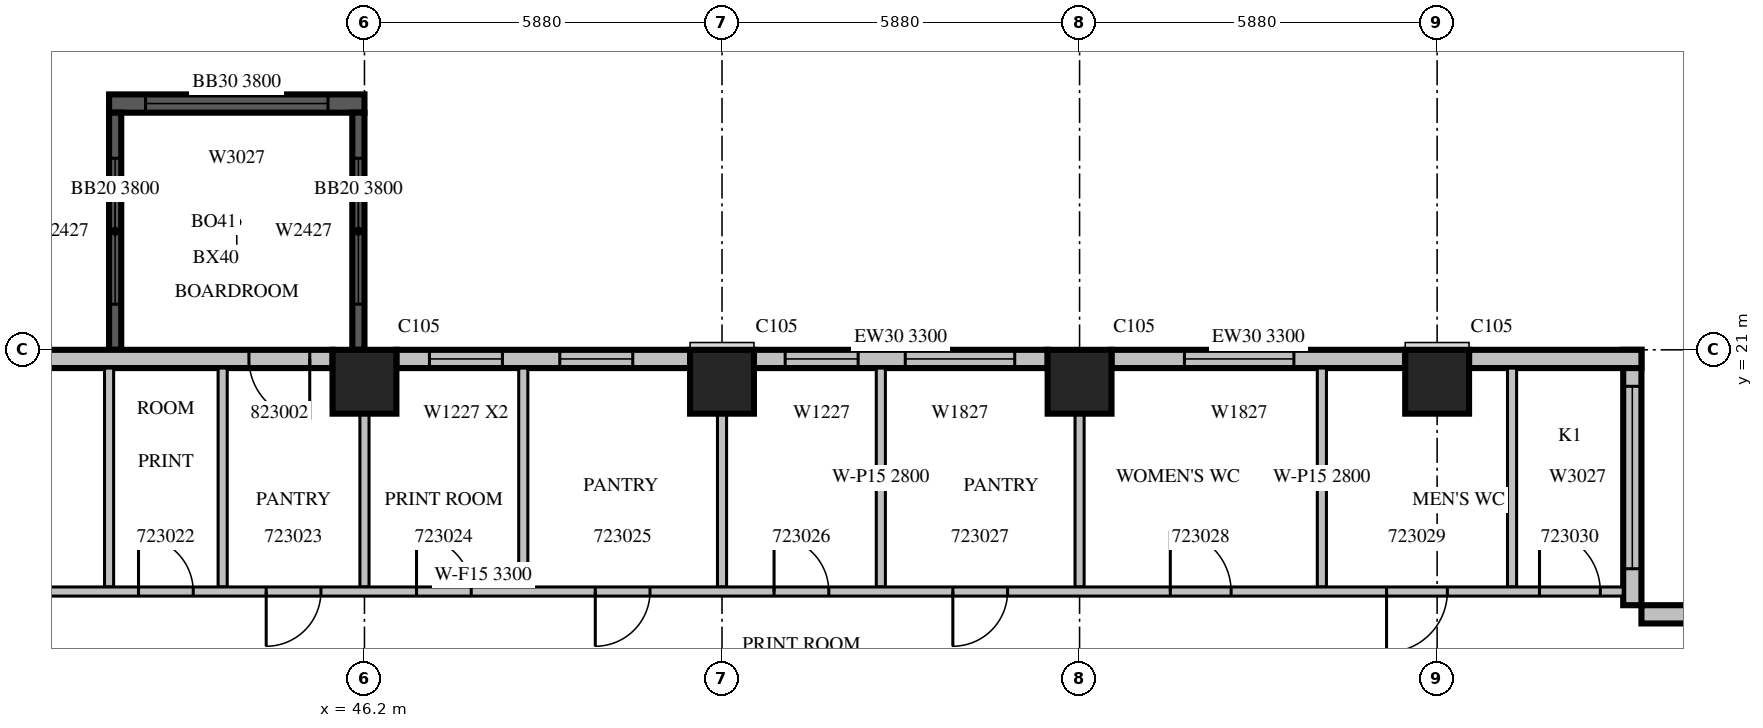
"""IFC4 building model, lengths in metres.
Left out: names, types, materials, properties, quantities, classifications, styles, units other than length and angle.
Written with IfcOpenShell. Run it as: python <this file> out.ifc"""

import sys

from ifc_helpers import new_model, si_unit, direction, frame, frame_2d, origin, origin_2d, place, context, subcontext, project, spatial, rectangle, extrude, source, transform, mapped, element, fill, save


model = new_model("IFC4")
c1 = context("Model", 3, precision=1e-05, world=origin(), true_north=direction((0.0, 1.0)))
c2 = subcontext(c1, "Body", "Model", "MODEL_VIEW")
j1 = project(units=[si_unit("LENGTHUNIT", "METRE"), si_unit("PLANEANGLEUNIT", "RADIAN")], contexts=[c1])
p1 = place(None, origin())
s1 = spatial("IfcSite", under=j1, at=p1, CompositionType="ELEMENT")
p2 = place(p1, origin())
s2 = spatial("IfcBuilding", under=s1, at=p2, CompositionType="ELEMENT")
p3 = place(p2, frame((0.0, 0.0, 107.7)))
s3 = spatial("IfcBuildingStorey", under=s2, at=p3, CompositionType="ELEMENT", Elevation=107.7)
m1 = source(origin(), c2, "Body", "SweptSolid", [
    extrude(rectangle(XDim=1.05, YDim=1.05, at=origin_2d()), origin(), (0.0, 0.0, 1.0), 4.2),
])
for number, where, z_axis, x_axis in (
    (1, (46.2, 20.475, 0.0), (0.0, 0.0, 1.0), (1.0, 0.0, 0.0)),
    (2, (52.08, 20.475, 0.0), (0.0, 0.0, 1.0), (1.0, 0.0, 0.0)),
    (3, (57.96, 20.475, 0.0), (0.0, 0.0, 1.0), (1.0, 0.0, 0.0)),
    (4, (63.84, 20.475, 0.0), (0.0, 0.0, 1.0), (1.0, 0.0, 0.0)),
):
    element("IfcColumn", number, at=place(p3, frame(where, z_axis=z_axis, x_axis=x_axis)), inside=s3, PredefinedType="COLUMN", context=c2, shape_type="MappedRepresentation", body=[
        mapped(m1, transform((0.0, 0.0, 0.0), scale=1.0)),
    ])
m2 = source(origin(), c2, "Body", "SweptSolid", [
    extrude(rectangle(XDim=4.2, YDim=0.3, at=frame_2d((2.1, 0.0))), origin(), (0.0, 0.0, 1.0), 3.8),
])
p4 = place(p3, frame((46.2, 25.05, 0.0), z_axis=(0.0, 0.0, 1.0), x_axis=(-1.0, 0.0, 0.0)))
e5 = element("IfcWall", 5, at=p4, inside=s3, PredefinedType="SOLIDWALL", context=c2, shape_type="MappedRepresentation", body=[
    mapped(m2, transform((0.0, 0.0, 0.0), scale=1.0)),
])
m3 = source(origin(), c2, "Body", "SweptSolid", [
    extrude(rectangle(XDim=3.0, YDim=2.7, at=frame_2d((1.5, 1.35))), frame((0.0, 0.16, 0.0), z_axis=(0.0, -1.0, 0.0), x_axis=(1.0, 0.0, 0.0)), (0.0, 0.0, 1.0), 0.32),
])
p5 = place(p4, frame((0.6, 0.0, 0.6)))
e6 = element("IfcOpeningElement", 6, at=p5, cuts=e5, PredefinedType="OPENING", context=c2, shape_type="MappedRepresentation", body=[
    mapped(m3, transform((0.0, 0.0, 0.0), scale=1.0)),
])
m4 = source(origin(), c2, "Body", "SweptSolid", [
    extrude(rectangle(XDim=3.9, YDim=0.2, at=frame_2d((1.95, 0.0))), origin(), (0.0, 0.0, 1.0), 3.8),
])
p6 = place(p3, frame((46.1, 21.0, 0.0), z_axis=(0.0, 0.0, 1.0), x_axis=(0.0, 1.0, 0.0)))
e7 = element("IfcWall", 7, at=p6, inside=s3, PredefinedType="SOLIDWALL", context=c2, shape_type="MappedRepresentation", body=[
    mapped(m4, transform((0.0, 0.0, 0.0), scale=1.0)),
])
m5 = source(origin(), c2, "Body", "SweptSolid", [
    extrude(rectangle(XDim=2.4, YDim=2.7, at=frame_2d((1.2, 1.35))), frame((0.0, 0.11, 0.0), z_axis=(0.0, -1.0, 0.0), x_axis=(1.0, 0.0, 0.0)), (0.0, 0.0, 1.0), 0.22),
])
p7 = place(p6, frame((0.75, 0.0, 0.6)))
e8 = element("IfcOpeningElement", 8, at=p7, cuts=e7, PredefinedType="OPENING", context=c2, shape_type="MappedRepresentation", body=[
    mapped(m5, transform((0.0, 0.0, 0.0), scale=1.0)),
])
p8 = place(p3, frame((42.1, 21.0, 0.0), z_axis=(0.0, 0.0, 1.0), x_axis=(0.0, 1.0, 0.0)))
e9 = element("IfcWall", 9, at=p8, inside=s3, PredefinedType="SOLIDWALL", context=c2, shape_type="MappedRepresentation", body=[
    mapped(m4, transform((0.0, 0.0, 0.0), scale=1.0)),
])
p9 = place(p8, frame((0.75, 0.0, 0.6)))
e10 = element("IfcOpeningElement", 10, at=p9, cuts=e9, PredefinedType="OPENING", context=c2, shape_type="MappedRepresentation", body=[
    mapped(m5, transform((0.0, 0.0, 0.0), scale=1.0)),
])
m6 = source(origin(), c2, "Body", "SweptSolid", [
    extrude(rectangle(XDim=4.2, YDim=0.3, at=frame_2d((2.1, 0.0))), origin(), (0.0, 0.0, 1.0), 3.8),
])
p10 = place(p3, frame((71.4, 16.65, 0.0), z_axis=(0.0, 0.0, 1.0), x_axis=(-1.0, 0.0, 0.0)))
e11 = element("IfcWall", 11, at=p10, inside=s3, PredefinedType="STANDARD", context=c2, shape_type="MappedRepresentation", body=[
    mapped(m6, transform((0.0, 0.0, 0.0), scale=1.0)),
])
m7 = source(origin(), c2, "Body", "SweptSolid", [
    extrude(rectangle(XDim=1.2, YDim=2.7, at=frame_2d((0.6, 1.35))), frame((0.0, 0.16, 0.0), z_axis=(0.0, -1.0, 0.0), x_axis=(1.0, 0.0, 0.0)), (0.0, 0.0, 1.0), 0.32),
])
p11 = place(p10, frame((0.66, 0.0, 0.6)))
e12 = element("IfcOpeningElement", 12, at=p11, cuts=e11, PredefinedType="OPENING", context=c2, shape_type="MappedRepresentation", body=[
    mapped(m7, transform((0.0, 0.0, 0.0), scale=1.0)),
])
p12 = place(p3, frame((67.05, 16.8, 0.0), z_axis=(0.0, 0.0, 1.0), x_axis=(0.0, 1.0, 0.0)))
e13 = element("IfcWall", 13, at=p12, inside=s3, PredefinedType="STANDARD", context=c2, shape_type="MappedRepresentation", body=[
    mapped(m6, transform((0.0, 0.0, 0.0), scale=1.0)),
])
p13 = place(p12, frame((0.6, 0.0, 0.6)))
e14 = element("IfcOpeningElement", 14, at=p13, cuts=e13, PredefinedType="OPENING", context=c2, shape_type="MappedRepresentation", body=[
    mapped(m3, transform((0.0, 0.0, 0.0), scale=1.0)),
])
m8 = source(origin(), c2, "Body", "SweptSolid", [
    extrude(rectangle(XDim=2.835, YDim=0.3, at=frame_2d((1.417, 0.0))), origin(), (0.0, 0.0, 1.0), 3.8),
])
p14 = place(p3, frame((67.2, 20.85, 0.0), z_axis=(0.0, 0.0, 1.0), x_axis=(-1.0, 0.0, 0.0)))
e15 = element("IfcWall", 15, at=p14, inside=s3, PredefinedType="STANDARD", context=c2, shape_type="MappedRepresentation", body=[
    mapped(m8, transform((0.0, 0.0, 0.0), scale=1.0)),
])
m9 = source(origin(), c2, "Body", "SweptSolid", [
    extrude(rectangle(XDim=4.83, YDim=0.3, at=frame_2d((2.415, 0.0))), origin(), (0.0, 0.0, 1.0), 3.3),
])
p15 = place(p3, frame((63.315, 20.85, 0.0), z_axis=(0.0, 0.0, 1.0), x_axis=(-1.0, 0.0, 0.0)))
e16 = element("IfcWall", 16, at=p15, inside=s3, PredefinedType="STANDARD", context=c2, shape_type="MappedRepresentation", body=[
    mapped(m9, transform((0.0, 0.0, 0.0), scale=1.0)),
])
m10 = source(origin(), c2, "Body", "SweptSolid", [
    extrude(rectangle(XDim=1.8, YDim=2.7, at=frame_2d((0.9, 1.35))), frame((0.0, 0.16, 0.0), z_axis=(0.0, -1.0, 0.0), x_axis=(1.0, 0.0, 0.0)), (0.0, 0.0, 1.0), 0.32),
])
p16 = place(p15, frame((1.831, 0.0, 0.6)))
e17 = element("IfcOpeningElement", 17, at=p16, cuts=e16, PredefinedType="OPENING", context=c2, shape_type="MappedRepresentation", body=[
    mapped(m10, transform((0.0, 0.0, 0.0), scale=1.0)),
])
p17 = place(p3, frame((57.435, 20.85, 0.0), z_axis=(0.0, 0.0, 1.0), x_axis=(-1.0, 0.0, 0.0)))
e18 = element("IfcWall", 18, at=p17, inside=s3, PredefinedType="STANDARD", context=c2, shape_type="MappedRepresentation", body=[
    mapped(m9, transform((0.0, 0.0, 0.0), scale=1.0)),
])
p18 = place(p17, frame((0.541, 0.0, 0.6)))
e19 = element("IfcOpeningElement", 19, at=p18, cuts=e18, PredefinedType="OPENING", context=c2, shape_type="MappedRepresentation", body=[
    mapped(m10, transform((0.0, 0.0, 0.0), scale=1.0)),
])
p19 = place(p17, frame((3.116, 0.0, 0.6)))
e20 = element("IfcOpeningElement", 20, at=p19, cuts=e18, PredefinedType="OPENING", context=c2, shape_type="MappedRepresentation", body=[
    mapped(m7, transform((0.0, 0.0, 0.0), scale=1.0)),
])
m11 = source(origin(), c2, "Body", "SweptSolid", [
    extrude(rectangle(XDim=4.83, YDim=0.3, at=frame_2d((2.415, 0.0))), origin(), (0.0, 0.0, 1.0), 3.8),
])
p20 = place(p3, frame((51.555, 20.85, 0.0), z_axis=(0.0, 0.0, 1.0), x_axis=(-1.0, 0.0, 0.0)))
e21 = element("IfcWall", 21, at=p20, inside=s3, PredefinedType="STANDARD", context=c2, shape_type="MappedRepresentation", body=[
    mapped(m11, transform((0.0, 0.0, 0.0), scale=1.0)),
])
p21 = place(p20, frame((3.087, 0.0, 0.6)))
e22 = element("IfcOpeningElement", 22, at=p21, cuts=e21, PredefinedType="OPENING", context=c2, shape_type="MappedRepresentation", body=[
    mapped(m7, transform((0.0, 0.0, 0.0), scale=1.0)),
])
p22 = place(p20, frame((0.943, 0.0, 0.6)))
e23 = element("IfcOpeningElement", 23, at=p22, cuts=e21, PredefinedType="OPENING", context=c2, shape_type="MappedRepresentation", body=[
    mapped(m7, transform((0.0, 0.0, 0.0), scale=1.0)),
])
m12 = source(origin(), c2, "Body", "SweptSolid", [
    extrude(rectangle(XDim=7.35, YDim=0.3, at=frame_2d((3.675, 0.0))), origin(), (0.0, 0.0, 1.0), 3.8),
])
p23 = place(p3, frame((45.675, 20.85, 0.0), z_axis=(0.0, 0.0, 1.0), x_axis=(-1.0, 0.0, 0.0)))
e24 = element("IfcWall", 24, at=p23, inside=s3, PredefinedType="STANDARD", context=c2, shape_type="MappedRepresentation", body=[
    mapped(m12, transform((0.0, 0.0, 0.0), scale=1.0)),
])
m13 = source(origin(), c2, "Body", "SweptSolid", [
    extrude(rectangle(XDim=1.0, YDim=2.1, at=frame_2d((0.5, 1.05))), frame((0.0, 0.16, 0.0), z_axis=(0.0, -1.0, 0.0), x_axis=(1.0, 0.0, 0.0)), (0.0, 0.0, 1.0), 0.32),
])
p24 = place(p23, frame((0.375, 0.0, 0.0)))
e25 = element("IfcOpeningElement", 25, at=p24, cuts=e24, PredefinedType="OPENING", context=c2, shape_type="MappedRepresentation", body=[
    mapped(m13, transform((0.0, 0.0, 0.0), scale=1.0)),
])
m14 = source(origin(), c2, "Body", "SweptSolid", [
    extrude(rectangle(XDim=3.6, YDim=0.15, at=frame_2d((1.8, 0.0))), origin(), (0.0, 0.0, 1.0), 3.8),
])
for number, where, z_axis, x_axis in (
    (26, (43.868, 20.7, 0.0), (0.0, 0.0, 1.0), (0.0, -1.0, 0.0)),
    (27, (48.812, 20.7, 0.0), (0.0, 0.0, 1.0), (0.0, -1.0, 0.0)),
):
    element("IfcWall", number, at=place(p3, frame(where, z_axis=z_axis, x_axis=x_axis)), inside=s3, PredefinedType="PARTITIONING", context=c2, shape_type="MappedRepresentation", body=[
        mapped(m14, transform((0.0, 0.0, 0.0), scale=1.0)),
    ])
m15 = source(origin(), c2, "Body", "SweptSolid", [
    extrude(rectangle(XDim=3.6, YDim=0.15, at=frame_2d((1.8, 0.0))), origin(), (0.0, 0.0, 1.0), 2.8),
])
for number, where, z_axis, x_axis in (
    (28, (54.692, 20.7, 0.0), (0.0, 0.0, 1.0), (0.0, -1.0, 0.0)),
    (29, (61.944, 20.7, 0.0), (0.0, 0.0, 1.0), (0.0, -1.0, 0.0)),
):
    element("IfcWall", number, at=place(p3, frame(where, z_axis=z_axis, x_axis=x_axis)), inside=s3, PredefinedType="PARTITIONING", context=c2, shape_type="MappedRepresentation", body=[
        mapped(m15, transform((0.0, 0.0, 0.0), scale=1.0)),
    ])
for number, where, z_axis, x_axis in (
    (30, (65.072, 20.7, 0.0), (0.0, 0.0, 1.0), (0.0, -1.0, 0.0)),
    (31, (42.0, 17.1, 0.0), (0.0, 0.0, 1.0), (0.0, 1.0, 0.0)),
):
    element("IfcWall", number, at=place(p3, frame(where, z_axis=z_axis, x_axis=x_axis)), inside=s3, PredefinedType="PARTITIONING", context=c2, shape_type="MappedRepresentation", body=[
        mapped(m14, transform((0.0, 0.0, 0.0), scale=1.0)),
    ])
m16 = source(origin(), c2, "Body", "SweptSolid", [
    extrude(rectangle(XDim=2.851, YDim=0.15, at=frame_2d((1.425, 0.0))), origin(), (0.0, 0.0, 1.0), 3.8),
])
for number, where, z_axis, x_axis in (
    (32, (46.2, 17.1, 0.0), (0.0, 0.0, 1.0), (0.0, 1.0, 0.0)),
    (33, (52.08, 17.1, 0.0), (0.0, 0.0, 1.0), (0.0, 1.0, 0.0)),
    (34, (57.96, 17.1, 0.0), (0.0, 0.0, 1.0), (0.0, 1.0, 0.0)),
):
    element("IfcWall", number, at=place(p3, frame(where, z_axis=z_axis, x_axis=x_axis)), inside=s3, PredefinedType="PARTITIONING", context=c2, shape_type="MappedRepresentation", body=[
        mapped(m16, transform((0.0, 0.0, 0.0), scale=1.0)),
    ])
m17 = source(origin(), c2, "Body", "SweptSolid", [
    extrude(rectangle(XDim=37.5, YDim=0.15, at=frame_2d((18.75, 0.0))), origin(), (0.0, 0.0, 1.0), 3.3),
])
p25 = place(p3, frame((29.4, 17.025, 0.0), z_axis=(0.0, 0.0, 1.0), x_axis=(1.0, 0.0, 0.0)))
e35 = element("IfcWall", 35, at=p25, inside=s3, PredefinedType="PARTITIONING", context=c2, shape_type="MappedRepresentation", body=[
    mapped(m17, transform((0.0, 0.0, 0.0), scale=1.0)),
])
m18 = source(origin(), c2, "Body", "SweptSolid", [
    extrude(rectangle(XDim=1.0, YDim=2.1, at=frame_2d((0.5, 1.05))), frame((0.0, 0.085, 0.0), z_axis=(0.0, -1.0, 0.0), x_axis=(1.0, 0.0, 0.0)), (0.0, 0.0, 1.0), 0.17),
])
p26 = place(p25, frame((1.357, 0.0, 0.0)))
e36 = element("IfcOpeningElement", 36, at=p26, cuts=e35, PredefinedType="OPENING", context=c2, shape_type="MappedRepresentation", body=[
    mapped(m18, transform((0.0, 0.0, 0.0), scale=1.0)),
])
p27 = place(p25, frame((4.669, 0.0, 0.0)))
e37 = element("IfcOpeningElement", 37, at=p27, cuts=e35, PredefinedType="OPENING", context=c2, shape_type="MappedRepresentation", body=[
    mapped(m18, transform((0.0, 0.0, 0.0), scale=1.0)),
])
p28 = place(p25, frame((7.012, 0.0, 0.0)))
e38 = element("IfcOpeningElement", 38, at=p28, cuts=e35, PredefinedType="OPENING", context=c2, shape_type="MappedRepresentation", body=[
    mapped(m18, transform((0.0, 0.0, 0.0), scale=1.0)),
])
m19 = source(origin(), c2, "Body", "SweptSolid", [
    extrude(rectangle(XDim=0.9, YDim=2.1, at=frame_2d((0.45, 1.05))), frame((0.0, 0.085, 0.0), z_axis=(0.0, -1.0, 0.0), x_axis=(1.0, 0.0, 0.0)), (0.0, 0.0, 1.0), 0.17),
])
p29 = place(p25, frame((10.05, 0.0, 0.0)))
e39 = element("IfcOpeningElement", 39, at=p29, cuts=e35, PredefinedType="OPENING", context=c2, shape_type="MappedRepresentation", body=[
    mapped(m19, transform((0.0, 0.0, 0.0), scale=1.0)),
])
p30 = place(p25, frame((13.084, 0.0, 0.0)))
e40 = element("IfcOpeningElement", 40, at=p30, cuts=e35, PredefinedType="OPENING", context=c2, shape_type="MappedRepresentation", body=[
    mapped(m19, transform((0.0, 0.0, 0.0), scale=1.0)),
])
p31 = place(p25, frame((15.184, 0.0, 0.0)))
e41 = element("IfcOpeningElement", 41, at=p31, cuts=e35, PredefinedType="OPENING", context=c2, shape_type="MappedRepresentation", body=[
    mapped(m19, transform((0.0, 0.0, 0.0), scale=1.0)),
])
p32 = place(p25, frame((17.656, 0.0, 0.0)))
e42 = element("IfcOpeningElement", 42, at=p32, cuts=e35, PredefinedType="OPENING", context=c2, shape_type="MappedRepresentation", body=[
    mapped(m19, transform((0.0, 0.0, 0.0), scale=1.0)),
])
p33 = place(p25, frame((20.596, 0.0, 0.0)))
e43 = element("IfcOpeningElement", 43, at=p33, cuts=e35, PredefinedType="OPENING", context=c2, shape_type="MappedRepresentation", body=[
    mapped(m19, transform((0.0, 0.0, 0.0), scale=1.0)),
])
p34 = place(p25, frame((23.536, 0.0, 0.0)))
e44 = element("IfcOpeningElement", 44, at=p34, cuts=e35, PredefinedType="OPENING", context=c2, shape_type="MappedRepresentation", body=[
    mapped(m19, transform((0.0, 0.0, 0.0), scale=1.0)),
])
p35 = place(p25, frame((26.476, 0.0, 0.0)))
e45 = element("IfcOpeningElement", 45, at=p35, cuts=e35, PredefinedType="OPENING", context=c2, shape_type="MappedRepresentation", body=[
    mapped(m19, transform((0.0, 0.0, 0.0), scale=1.0)),
])
p36 = place(p25, frame((30.052, 0.0, 0.0)))
e46 = element("IfcOpeningElement", 46, at=p36, cuts=e35, PredefinedType="OPENING", context=c2, shape_type="MappedRepresentation", body=[
    mapped(m18, transform((0.0, 0.0, 0.0), scale=1.0)),
])
p37 = place(p25, frame((33.608, 0.0, 0.0)))
e47 = element("IfcOpeningElement", 47, at=p37, cuts=e35, PredefinedType="OPENING", context=c2, shape_type="MappedRepresentation", body=[
    mapped(m18, transform((0.0, 0.0, 0.0), scale=1.0)),
])
p38 = place(p25, frame((36.124, 0.0, 0.0)))
e48 = element("IfcOpeningElement", 48, at=p38, cuts=e35, PredefinedType="OPENING", context=c2, shape_type="MappedRepresentation", body=[
    mapped(m18, transform((0.0, 0.0, 0.0), scale=1.0)),
])
m20 = source(origin(), c2, "Body", "SweptSolid", [
    extrude(rectangle(XDim=3.0, YDim=2.7, at=frame_2d((1.5, 1.35))), frame((0.0, 0.03, 0.0), z_axis=(0.0, -1.0, 0.0), x_axis=(1.0, 0.0, 0.0)), (0.0, 0.0, 1.0), 0.06),
])
p39 = place(p5, origin())
e49 = element("IfcWindow", 49, at=p39, inside=s3, PartitioningType="SINGLE_PANEL", PredefinedType="WINDOW", context=c2, shape_type="MappedRepresentation", body=[
    mapped(m20, transform((0.0, 0.0, 0.0), scale=1.0)),
])
fill(e6, e49)
m21 = source(origin(), c2, "Body", "SweptSolid", [
    extrude(rectangle(XDim=2.4, YDim=2.7, at=frame_2d((1.2, 1.35))), frame((0.0, 0.03, 0.0), z_axis=(0.0, -1.0, 0.0), x_axis=(1.0, 0.0, 0.0)), (0.0, 0.0, 1.0), 0.06),
])
p40 = place(p7, origin())
e50 = element("IfcWindow", 50, at=p40, inside=s3, PartitioningType="SINGLE_PANEL", PredefinedType="WINDOW", context=c2, shape_type="MappedRepresentation", body=[
    mapped(m21, transform((0.0, 0.0, 0.0), scale=1.0)),
])
fill(e8, e50)
p41 = place(p9, origin())
e51 = element("IfcWindow", 51, at=p41, inside=s3, PartitioningType="SINGLE_PANEL", PredefinedType="WINDOW", context=c2, shape_type="MappedRepresentation", body=[
    mapped(m21, transform((0.0, 0.0, 0.0), scale=1.0)),
])
fill(e10, e51)
p42 = place(p13, origin())
e52 = element("IfcWindow", 52, at=p42, inside=s3, PartitioningType="SINGLE_PANEL", PredefinedType="WINDOW", context=c2, shape_type="MappedRepresentation", body=[
    mapped(m20, transform((0.0, 0.0, 0.0), scale=1.0)),
])
fill(e14, e52)
m22 = source(origin(), c2, "Body", "SweptSolid", [
    extrude(rectangle(XDim=1.8, YDim=2.7, at=frame_2d((0.9, 1.35))), frame((0.0, 0.03, 0.0), z_axis=(0.0, -1.0, 0.0), x_axis=(1.0, 0.0, 0.0)), (0.0, 0.0, 1.0), 0.06),
])
p43 = place(p16, origin())
e53 = element("IfcWindow", 53, at=p43, inside=s3, PartitioningType="SINGLE_PANEL", PredefinedType="WINDOW", context=c2, shape_type="MappedRepresentation", body=[
    mapped(m22, transform((0.0, 0.0, 0.0), scale=1.0)),
])
fill(e17, e53)
m23 = source(origin(), c2, "Body", "SweptSolid", [
    extrude(rectangle(XDim=1.2, YDim=2.7, at=frame_2d((0.6, 1.35))), frame((0.0, 0.03, 0.0), z_axis=(0.0, -1.0, 0.0), x_axis=(1.0, 0.0, 0.0)), (0.0, 0.0, 1.0), 0.06),
])
p44 = place(p21, origin())
e54 = element("IfcWindow", 54, at=p44, inside=s3, PartitioningType="SINGLE_PANEL", PredefinedType="WINDOW", context=c2, shape_type="MappedRepresentation", body=[
    mapped(m23, transform((0.0, 0.0, 0.0), scale=1.0)),
])
fill(e22, e54)
p45 = place(p22, origin())
e55 = element("IfcWindow", 55, at=p45, inside=s3, PartitioningType="SINGLE_PANEL", PredefinedType="WINDOW", context=c2, shape_type="MappedRepresentation", body=[
    mapped(m23, transform((0.0, 0.0, 0.0), scale=1.0)),
])
fill(e23, e55)
p46 = place(p18, origin())
e56 = element("IfcWindow", 56, at=p46, inside=s3, PartitioningType="SINGLE_PANEL", PredefinedType="WINDOW", context=c2, shape_type="MappedRepresentation", body=[
    mapped(m22, transform((0.0, 0.0, 0.0), scale=1.0)),
])
fill(e19, e56)
p47 = place(p19, origin())
e57 = element("IfcWindow", 57, at=p47, inside=s3, PartitioningType="SINGLE_PANEL", PredefinedType="WINDOW", context=c2, shape_type="MappedRepresentation", body=[
    mapped(m23, transform((0.0, 0.0, 0.0), scale=1.0)),
])
fill(e20, e57)
m24 = source(origin(), c2, "Body", "SweptSolid", [
    extrude(rectangle(XDim=0.9, YDim=2.1, at=frame_2d((0.45, 1.05))), frame((0.0, 0.025, 0.0), z_axis=(0.0, -1.0, 0.0), x_axis=(1.0, 0.0, 0.0)), (0.0, 0.0, 1.0), 0.05),
])
p48 = place(p30, origin())
e58 = element("IfcDoor", 58, at=p48, inside=s3, OperationType="SINGLE_SWING_LEFT", PredefinedType="DOOR", context=c2, shape_type="MappedRepresentation", body=[
    mapped(m24, transform((0.0, 0.0, 0.0), scale=1.0)),
])
fill(e40, e58)
p49 = place(p31, origin())
e59 = element("IfcDoor", 59, at=p49, inside=s3, OperationType="SINGLE_SWING_RIGHT", PredefinedType="DOOR", context=c2, shape_type="MappedRepresentation", body=[
    mapped(m24, transform((0.0, 0.0, 0.0), scale=1.0)),
])
fill(e41, e59)
p50 = place(p32, origin())
e60 = element("IfcDoor", 60, at=p50, inside=s3, OperationType="SINGLE_SWING_LEFT", PredefinedType="DOOR", context=c2, shape_type="MappedRepresentation", body=[
    mapped(m24, transform((0.0, 0.0, 0.0), scale=1.0)),
])
fill(e42, e60)
p51 = place(p33, origin())
e61 = element("IfcDoor", 61, at=p51, inside=s3, OperationType="SINGLE_SWING_RIGHT", PredefinedType="DOOR", context=c2, shape_type="MappedRepresentation", body=[
    mapped(m24, transform((0.0, 0.0, 0.0), scale=1.0)),
])
fill(e43, e61)
p52 = place(p34, origin())
e62 = element("IfcDoor", 62, at=p52, inside=s3, OperationType="SINGLE_SWING_LEFT", PredefinedType="DOOR", context=c2, shape_type="MappedRepresentation", body=[
    mapped(m24, transform((0.0, 0.0, 0.0), scale=1.0)),
])
fill(e44, e62)
p53 = place(p35, origin())
e63 = element("IfcDoor", 63, at=p53, inside=s3, OperationType="SINGLE_SWING_RIGHT", PredefinedType="DOOR", context=c2, shape_type="MappedRepresentation", body=[
    mapped(m24, transform((0.0, 0.0, 0.0), scale=1.0)),
])
fill(e45, e63)
m25 = source(origin(), c2, "Body", "SweptSolid", [
    extrude(rectangle(XDim=1.0, YDim=2.1, at=frame_2d((0.5, 1.05))), frame((0.0, 0.025, 0.0), z_axis=(0.0, -1.0, 0.0), x_axis=(1.0, 0.0, 0.0)), (0.0, 0.0, 1.0), 0.05),
])
p54 = place(p36, origin())
e64 = element("IfcDoor", 64, at=p54, inside=s3, OperationType="SINGLE_SWING_LEFT", PredefinedType="DOOR", context=c2, shape_type="MappedRepresentation", body=[
    mapped(m25, transform((0.0, 0.0, 0.0), scale=1.0)),
])
fill(e46, e64)
p55 = place(p37, origin())
e65 = element("IfcDoor", 65, at=p55, inside=s3, OperationType="SINGLE_SWING_RIGHT", PredefinedType="DOOR", context=c2, shape_type="MappedRepresentation", body=[
    mapped(m25, transform((0.0, 0.0, 0.0), scale=1.0)),
])
fill(e47, e65)
p56 = place(p38, origin())
e66 = element("IfcDoor", 66, at=p56, inside=s3, OperationType="SINGLE_SWING_LEFT", PredefinedType="DOOR", context=c2, shape_type="MappedRepresentation", body=[
    mapped(m25, transform((0.0, 0.0, 0.0), scale=1.0)),
])
fill(e48, e66)
p57 = place(p24, origin())
e67 = element("IfcDoor", 67, at=p57, inside=s3, OperationType="SINGLE_SWING_LEFT", PredefinedType="DOOR", context=c2, shape_type="MappedRepresentation", body=[
    mapped(m25, transform((0.0, 0.0, 0.0), scale=1.0)),
])
fill(e25, e67)
save(model, sys.argv[1])
